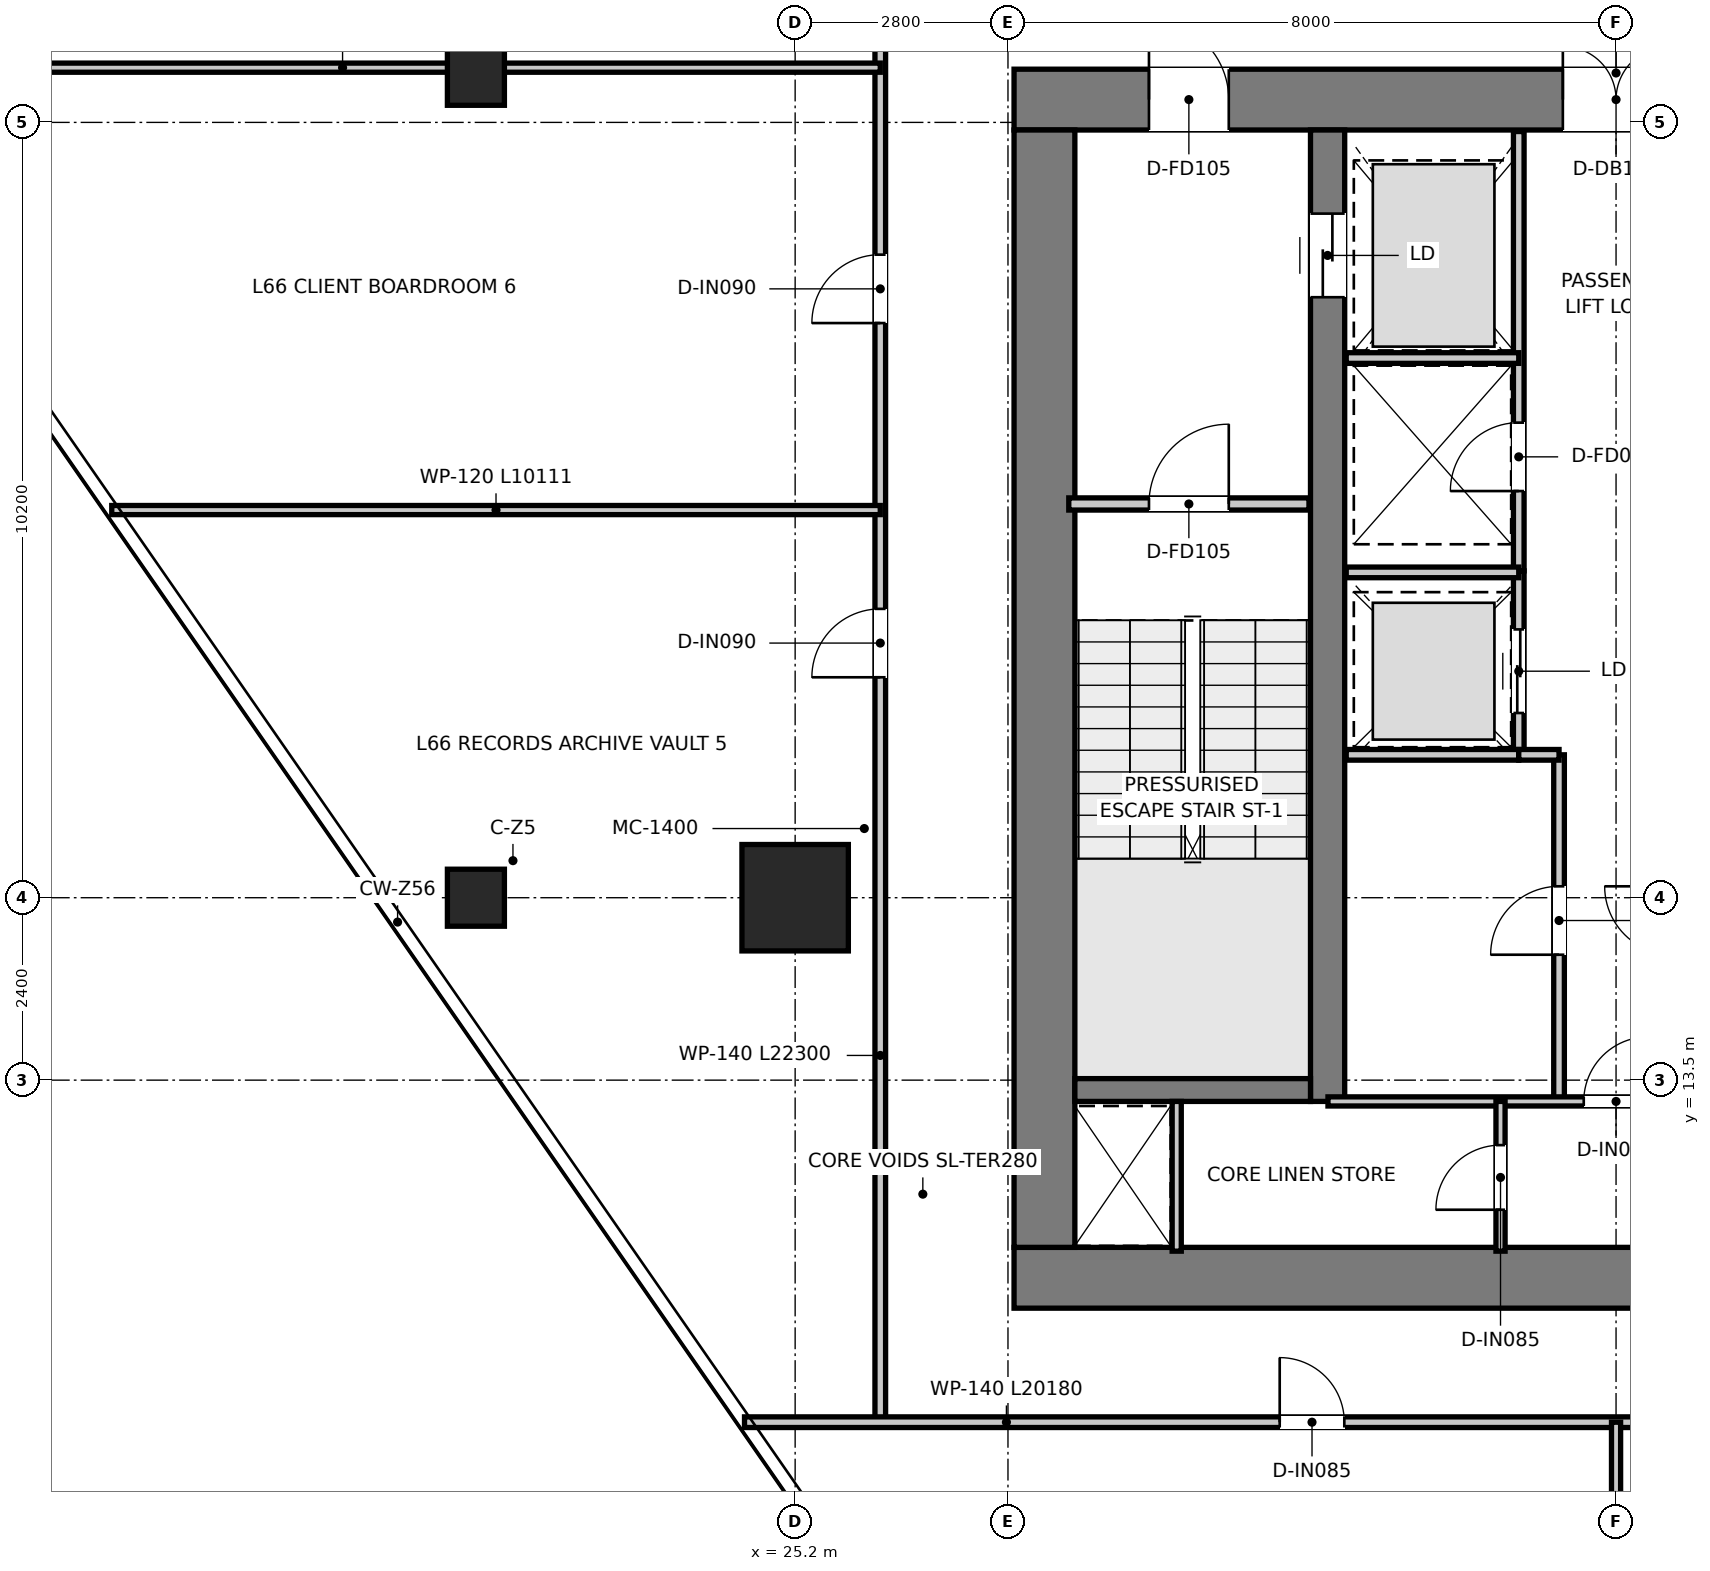
"""IFC4 building model, lengths in metres.
Left out: names, types, materials, properties, quantities, classifications, styles, units other than length and angle.
Written with IfcOpenShell. Run it as: python <this file> out.ifc"""

import sys

from ifc_helpers import new_model, si_unit, direction, frame, frame_2d, origin, origin_2d, place, context, subcontext, project, spatial, rectangle, extrude, source, transform, mapped, element, fill, save


model = new_model("IFC4")
c1 = context("Model", 3, precision=1e-05, world=origin(), true_north=direction((0.0, 1.0)))
c2 = subcontext(c1, "Body", "Model", "MODEL_VIEW")
j1 = project(units=[si_unit("LENGTHUNIT", "METRE"), si_unit("PLANEANGLEUNIT", "RADIAN")], contexts=[c1])
p1 = place(None, origin())
s1 = spatial("IfcSite", under=j1, at=p1, CompositionType="ELEMENT")
p2 = place(p1, origin())
s2 = spatial("IfcBuilding", under=s1, at=p2, CompositionType="ELEMENT")
p3 = place(p2, frame((0.0, 0.0, 271.35)))
s3 = spatial("IfcBuildingStorey", under=s2, at=p3, CompositionType="ELEMENT", Elevation=271.35)
p4 = place(p3, frame((28.08, 10.9, 0.0), z_axis=(0.0, 0.0, 1.0), x_axis=(1.0, 0.0, 0.0)))
e1 = element("IfcWall", 1, at=p4, inside=s3, PredefinedType="SHEAR", context=c2, shape_type="SweptSolid", body=[
    extrude(rectangle(XDim=15.84, YDim=0.8, at=frame_2d((7.92, 0.0))), origin(), (0.0, 0.0, 1.0), 3.95),
])
p5 = place(p3, frame((28.08, 26.4, 0.0), z_axis=(0.0, 0.0, 1.0), x_axis=(1.0, 0.0, 0.0)))
e2 = element("IfcWall", 2, at=p5, inside=s3, PredefinedType="SHEAR", context=c2, shape_type="SweptSolid", body=[
    extrude(rectangle(XDim=15.84, YDim=0.8, at=frame_2d((7.92, 0.0))), origin(), (0.0, 0.0, 1.0), 3.95),
])
p6 = place(p5, frame((7.22, 0.0, 0.0)))
e3 = element("IfcOpeningElement", 3, at=p6, cuts=e2, PredefinedType="OPENING", context=c2, shape_type="SweptSolid", body=[
    extrude(rectangle(XDim=1.4, YDim=2.2, at=frame_2d((0.7, 1.1))), frame((0.0, 0.41, 0.0), z_axis=(0.0, -1.0, 0.0), x_axis=(1.0, 0.0, 0.0)), (0.0, 0.0, 1.0), 0.82),
])
p7 = place(p5, frame((1.775, 0.0, 0.0)))
e4 = element("IfcOpeningElement", 4, at=p7, cuts=e2, PredefinedType="OPENING", context=c2, shape_type="SweptSolid", body=[
    extrude(rectangle(XDim=1.05, YDim=2.1, at=frame_2d((0.525, 1.05))), frame((0.0, 0.41, 0.0), z_axis=(0.0, -1.0, 0.0), x_axis=(1.0, 0.0, 0.0)), (0.0, 0.0, 1.0), 0.82),
])
p8 = place(p5, frame((13.015, 0.0, 0.0)))
e5 = element("IfcOpeningElement", 5, at=p8, cuts=e2, PredefinedType="OPENING", context=c2, shape_type="SweptSolid", body=[
    extrude(rectangle(XDim=1.05, YDim=2.1, at=frame_2d((0.525, 1.05))), frame((0.0, 0.41, 0.0), z_axis=(0.0, -1.0, 0.0), x_axis=(1.0, 0.0, 0.0)), (0.0, 0.0, 1.0), 0.82),
])
p9 = place(p3, frame((28.48, 11.3, 0.0), z_axis=(0.0, 0.0, 1.0), x_axis=(0.0, 1.0, 0.0)))
e6 = element("IfcWall", 6, at=p9, inside=s3, PredefinedType="SHEAR", context=c2, shape_type="SweptSolid", body=[
    extrude(rectangle(XDim=14.7, YDim=0.8, at=frame_2d((7.35, 0.0))), origin(), (0.0, 0.0, 1.0), 3.95),
])
p10 = place(p3, frame((32.205, 13.22, 0.0), z_axis=(0.0, 0.0, 1.0), x_axis=(0.0, 1.0, 0.0)))
e7 = element("IfcWall", 7, at=p10, inside=s3, PredefinedType="SHEAR", context=c2, shape_type="SweptSolid", body=[
    extrude(rectangle(XDim=12.78, YDim=0.45, at=frame_2d((6.39, 0.0))), origin(), (0.0, 0.0, 1.0), 3.95),
])
p11 = place(p10, frame((10.58, 0.0, 0.0)))
e8 = element("IfcOpeningElement", 8, at=p11, cuts=e7, PredefinedType="OPENING", context=c2, shape_type="SweptSolid", body=[
    extrude(rectangle(XDim=1.1, YDim=2.15, at=frame_2d((0.55, 1.075))), frame((0.0, 0.235, 0.0), z_axis=(0.0, -1.0, 0.0), x_axis=(1.0, 0.0, 0.0)), (0.0, 0.0, 1.0), 0.47),
])
p12 = place(p3, frame((28.88, 13.37, 0.0), z_axis=(0.0, 0.0, 1.0), x_axis=(1.0, 0.0, 0.0)))
e9 = element("IfcWall", 9, at=p12, inside=s3, PredefinedType="SHEAR", context=c2, shape_type="SweptSolid", body=[
    extrude(rectangle(XDim=3.1, YDim=0.3, at=frame_2d((1.55, 0.0))), origin(), (0.0, 0.0, 1.0), 3.95),
])
m1 = source(origin(), c2, "Body", "SweptSolid", [
    extrude(rectangle(XDim=1.4, YDim=1.4, at=origin_2d()), origin(), (0.0, 0.0, 1.0), 3.95),
])
p13 = place(p3, frame((25.2, 15.9, 0.0), z_axis=(0.0, 0.0, 1.0), x_axis=(1.0, 0.0, 0.0)))
e10 = element("IfcColumn", 10, at=p13, inside=s3, PredefinedType="USERDEFINED", context=c2, shape_type="MappedRepresentation", body=[
    mapped(m1, transform((0.0, 0.0, 0.0), x_axis=(1.0, 0.0, 0.0), y_axis=(0.0, 1.0, 0.0), z_axis=(0.0, 0.0, 1.0), scale=1.0)),
])
m2 = source(origin(), c2, "Body", "SweptSolid", [
    extrude(rectangle(XDim=0.75, YDim=0.75, at=origin_2d()), origin(), (0.0, 0.0, 1.0), 3.95),
])
for number, where, z_axis, x_axis in (
    (11, (21.0, 15.9, 0.0), (0.0, 0.0, 1.0), (1.0, 0.0, 0.0)),
    (12, (21.0, 26.7, 0.0), (0.0, 0.0, 1.0), (1.0, 0.0, 0.0)),
):
    element("IfcColumn", number, at=place(p3, frame(where, z_axis=z_axis, x_axis=x_axis)), inside=s3, PredefinedType="COLUMN", context=c2, shape_type="MappedRepresentation", body=[
        mapped(m2, transform((0.0, 0.0, 0.0), x_axis=(1.0, 0.0, 0.0), y_axis=(0.0, 1.0, 0.0), z_axis=(0.0, 0.0, 1.0), scale=1.0)),
    ])
p14 = place(p3, frame((28.8, 21.08, 0.0), z_axis=(0.0, 0.0, 1.0), x_axis=(1.0, 0.0, 0.0)))
e13 = element("IfcWall", 13, at=p14, inside=s3, PredefinedType="PARTITIONING", context=c2, shape_type="SweptSolid", body=[
    extrude(rectangle(XDim=3.16, YDim=0.16, at=frame_2d((1.58, 0.0))), origin(), (0.0, 0.0, 1.0), 3.67),
])
p15 = place(p14, frame((1.055, 0.0, 0.0)))
e14 = element("IfcOpeningElement", 14, at=p15, cuts=e13, PredefinedType="OPENING", context=c2, shape_type="SweptSolid", body=[
    extrude(rectangle(XDim=1.05, YDim=2.1, at=frame_2d((0.525, 1.05))), frame((0.0, 0.09, 0.0), z_axis=(0.0, -1.0, 0.0), x_axis=(1.0, 0.0, 0.0)), (0.0, 0.0, 1.0), 0.18),
])
p16 = place(p3, frame((34.72, 20.2, 0.0), z_axis=(0.0, 0.0, 1.0), x_axis=(0.0, 1.0, 0.0)))
e15 = element("IfcWall", 15, at=p16, inside=s3, PredefinedType="PARTITIONING", context=c2, shape_type="SweptSolid", body=[
    extrude(rectangle(XDim=5.78, YDim=0.14, at=frame_2d((2.89, 0.0))), origin(), (0.0, 0.0, 1.0), 2.82),
])
p17 = place(p16, frame((1.05, 0.0, 0.0)))
e16 = element("IfcOpeningElement", 16, at=p17, cuts=e15, PredefinedType="OPENING", context=c2, shape_type="SweptSolid", body=[
    extrude(rectangle(XDim=0.9, YDim=2.1, at=frame_2d((0.45, 1.05))), frame((0.0, 0.08, 0.0), z_axis=(0.0, -1.0, 0.0), x_axis=(1.0, 0.0, 0.0)), (0.0, 0.0, 1.0), 0.16),
])
p18 = place(p3, frame((32.45, 23.0, 0.0), z_axis=(0.0, 0.0, 1.0), x_axis=(1.0, 0.0, 0.0)))
e17 = element("IfcWall", 17, at=p18, inside=s3, PredefinedType="PARTITIONING", context=c2, shape_type="SweptSolid", body=[
    extrude(rectangle(XDim=2.27, YDim=0.14, at=frame_2d((1.135, 0.0))), origin(), (0.0, 0.0, 1.0), 2.82),
])
p19 = place(p3, frame((34.72, 17.78, 0.0), z_axis=(0.0, 0.0, 1.0), x_axis=(0.0, 1.0, 0.0)))
e18 = element("IfcWall", 18, at=p19, inside=s3, PredefinedType="PARTITIONING", context=c2, shape_type="SweptSolid", body=[
    extrude(rectangle(XDim=2.42, YDim=0.14, at=frame_2d((1.21, 0.0))), origin(), (0.0, 0.0, 1.0), 3.67),
])
p20 = place(p19, frame((0.55, 0.0, 0.0)))
e19 = element("IfcOpeningElement", 19, at=p20, cuts=e18, PredefinedType="OPENING", context=c2, shape_type="SweptSolid", body=[
    extrude(rectangle(XDim=1.1, YDim=2.15, at=frame_2d((0.55, 1.075))), frame((0.0, 0.08, 0.0), z_axis=(0.0, -1.0, 0.0), x_axis=(1.0, 0.0, 0.0)), (0.0, 0.0, 1.0), 0.16),
])
for number, where, z_axis, x_axis in (
    (20, (32.45, 17.78, 0.0), (0.0, 0.0, 1.0), (1.0, 0.0, 0.0)),
    (21, (32.45, 20.18, 0.0), (0.0, 0.0, 1.0), (1.0, 0.0, 0.0)),
):
    element("IfcWall", number, at=place(p3, frame(where, z_axis=z_axis, x_axis=x_axis)), inside=s3, PredefinedType="PARTITIONING", context=c2, shape_type="SweptSolid", body=[
        extrude(rectangle(XDim=2.27, YDim=0.14, at=frame_2d((1.135, 0.0))), origin(), (0.0, 0.0, 1.0), 3.67),
    ])
p21 = place(p3, frame((35.25, 13.22, 0.0), z_axis=(0.0, 0.0, 1.0), x_axis=(0.0, 1.0, 0.0)))
e22 = element("IfcWall", 22, at=p21, inside=s3, PredefinedType="PARTITIONING", context=c2, shape_type="SweptSolid", body=[
    extrude(rectangle(XDim=4.56, YDim=0.14, at=frame_2d((2.28, 0.0))), origin(), (0.0, 0.0, 1.0), 3.67),
])
p22 = place(p21, frame((1.93, 0.0, 0.0)))
e23 = element("IfcOpeningElement", 23, at=p22, cuts=e22, PredefinedType="OPENING", context=c2, shape_type="SweptSolid", body=[
    extrude(rectangle(XDim=0.9, YDim=2.1, at=frame_2d((0.45, 1.05))), frame((0.0, 0.08, 0.0), z_axis=(0.0, -1.0, 0.0), x_axis=(1.0, 0.0, 0.0)), (0.0, 0.0, 1.0), 0.16),
])
p23 = place(p3, frame((34.72, 17.78, 0.0), z_axis=(0.0, 0.0, 1.0), x_axis=(1.0, 0.0, 0.0)))
e24 = element("IfcWall", 24, at=p23, inside=s3, PredefinedType="PARTITIONING", context=c2, shape_type="SweptSolid", body=[
    extrude(rectangle(XDim=0.53, YDim=0.14, at=frame_2d((0.265, 0.0))), origin(), (0.0, 0.0, 1.0), 3.67),
])
p24 = place(p3, frame((30.22, 11.25, 0.0), z_axis=(0.0, 0.0, 1.0), x_axis=(0.0, 1.0, 0.0)))
e25 = element("IfcWall", 25, at=p24, inside=s3, PredefinedType="PARTITIONING", context=c2, shape_type="SweptSolid", body=[
    extrude(rectangle(XDim=1.97, YDim=0.12, at=frame_2d((0.985, 0.0))), origin(), (0.0, 0.0, 1.0), 3.67),
])
p25 = place(p3, frame((32.21, 13.22, 0.0), z_axis=(0.0, 0.0, 1.0), x_axis=(1.0, 0.0, 0.0)))
e26 = element("IfcWall", 26, at=p25, inside=s3, PredefinedType="PARTITIONING", context=c2, shape_type="SweptSolid", body=[
    extrude(rectangle(XDim=7.58, YDim=0.12, at=frame_2d((3.79, 0.0))), origin(), (0.0, 0.0, 1.0), 3.67),
])
p26 = place(p25, frame((3.365, 0.0, 0.0)))
e27 = element("IfcOpeningElement", 27, at=p26, cuts=e26, PredefinedType="OPENING", context=c2, shape_type="SweptSolid", body=[
    extrude(rectangle(XDim=0.85, YDim=2.1, at=frame_2d((0.425, 1.05))), frame((0.0, 0.07, 0.0), z_axis=(0.0, -1.0, 0.0), x_axis=(1.0, 0.0, 0.0)), (0.0, 0.0, 1.0), 0.14),
])
p27 = place(p3, frame((34.48, 11.25, 0.0), z_axis=(0.0, 0.0, 1.0), x_axis=(0.0, 1.0, 0.0)))
e28 = element("IfcWall", 28, at=p27, inside=s3, PredefinedType="PARTITIONING", context=c2, shape_type="SweptSolid", body=[
    extrude(rectangle(XDim=1.97, YDim=0.12, at=frame_2d((0.985, 0.0))), origin(), (0.0, 0.0, 1.0), 3.67),
])
p28 = place(p27, frame((0.545, 0.0, 0.0)))
e29 = element("IfcOpeningElement", 29, at=p28, cuts=e28, PredefinedType="OPENING", context=c2, shape_type="SweptSolid", body=[
    extrude(rectangle(XDim=0.85, YDim=2.1, at=frame_2d((0.425, 1.05))), frame((0.0, 0.07, 0.0), z_axis=(0.0, -1.0, 0.0), x_axis=(1.0, 0.0, 0.0)), (0.0, 0.0, 1.0), 0.14),
])
p29 = place(p3, frame((26.32, 9.0, 0.0), z_axis=(0.0, 0.0, 1.0), x_axis=(0.0, 1.0, 0.0)))
e30 = element("IfcWall", 30, at=p29, inside=s3, PredefinedType="PARTITIONING", context=c2, shape_type="SweptSolid", body=[
    extrude(rectangle(XDim=19.66, YDim=0.14, at=frame_2d((9.83, 0.0))), origin(), (0.0, 0.0, 1.0), 3.13),
])
p30 = place(p29, frame((18.3, 0.0, 0.0)))
e31 = element("IfcOpeningElement", 31, at=p30, cuts=e30, PredefinedType="OPENING", context=c2, shape_type="SweptSolid", body=[
    extrude(rectangle(XDim=0.9, YDim=2.1, at=frame_2d((0.45, 1.05))), frame((0.0, 0.08, 0.0), z_axis=(0.0, -1.0, 0.0), x_axis=(1.0, 0.0, 0.0)), (0.0, 0.0, 1.0), 0.16),
])
p31 = place(p29, frame((9.8, 0.0, 0.0)))
e32 = element("IfcOpeningElement", 32, at=p31, cuts=e30, PredefinedType="OPENING", context=c2, shape_type="SweptSolid", body=[
    extrude(rectangle(XDim=0.9, YDim=2.1, at=frame_2d((0.45, 1.05))), frame((0.0, 0.08, 0.0), z_axis=(0.0, -1.0, 0.0), x_axis=(1.0, 0.0, 0.0)), (0.0, 0.0, 1.0), 0.16),
])
p32 = place(p29, frame((14.46, 0.0, 0.0)))
e33 = element("IfcOpeningElement", 33, at=p32, cuts=e30, PredefinedType="OPENING", context=c2, shape_type="SweptSolid", body=[
    extrude(rectangle(XDim=0.9, YDim=2.1, at=frame_2d((0.45, 1.05))), frame((0.0, 0.08, 0.0), z_axis=(0.0, -1.0, 0.0), x_axis=(1.0, 0.0, 0.0)), (0.0, 0.0, 1.0), 0.16),
])
p33 = place(p3, frame((24.534, 9.0, 0.0), z_axis=(0.0, 0.0, 1.0), x_axis=(1.0, 0.0, 0.0)))
e34 = element("IfcWall", 34, at=p33, inside=s3, PredefinedType="PARTITIONING", context=c2, shape_type="SweptSolid", body=[
    extrude(rectangle(XDim=20.18, YDim=0.14, at=frame_2d((10.09, 0.0))), origin(), (0.0, 0.0, 1.0), 3.67),
])
p34 = place(p33, frame((7.041, 0.0, 0.0)))
e35 = element("IfcOpeningElement", 35, at=p34, cuts=e34, PredefinedType="OPENING", context=c2, shape_type="SweptSolid", body=[
    extrude(rectangle(XDim=0.85, YDim=2.1, at=frame_2d((0.425, 1.05))), frame((0.0, 0.08, 0.0), z_axis=(0.0, -1.0, 0.0), x_axis=(1.0, 0.0, 0.0)), (0.0, 0.0, 1.0), 0.16),
])
p35 = place(p33, frame((15.041, 0.0, 0.0)))
e36 = element("IfcOpeningElement", 36, at=p35, cuts=e34, PredefinedType="OPENING", context=c2, shape_type="SweptSolid", body=[
    extrude(rectangle(XDim=0.85, YDim=2.1, at=frame_2d((0.425, 1.05))), frame((0.0, 0.08, 0.0), z_axis=(0.0, -1.0, 0.0), x_axis=(1.0, 0.0, 0.0)), (0.0, 0.0, 1.0), 0.16),
])
p36 = place(p3, frame((12.172, 26.82, 0.0), z_axis=(0.0, 0.0, 1.0), x_axis=(1.0, 0.0, 0.0)))
e37 = element("IfcWall", 37, at=p36, inside=s3, PredefinedType="PARTITIONING", context=c2, shape_type="SweptSolid", body=[
    extrude(rectangle(XDim=14.148, YDim=0.12, at=frame_2d((7.074, 0.0))), origin(), (0.0, 0.0, 1.0), 3.13),
])
p37 = place(p3, frame((16.209, 21.0, 0.0), z_axis=(0.0, 0.0, 1.0), x_axis=(1.0, 0.0, 0.0)))
e38 = element("IfcWall", 38, at=p37, inside=s3, PredefinedType="PARTITIONING", context=c2, shape_type="SweptSolid", body=[
    extrude(rectangle(XDim=10.111, YDim=0.12, at=frame_2d((5.055, 0.0))), origin(), (0.0, 0.0, 1.0), 3.13),
])
p38 = place(p3, frame((36.0, 2.955, 0.0), z_axis=(0.0, 0.0, 1.0), x_axis=(0.0, 1.0, 0.0)))
e39 = element("IfcWall", 39, at=p38, inside=s3, PredefinedType="PARTITIONING", context=c2, shape_type="SweptSolid", body=[
    extrude(rectangle(XDim=6.045, YDim=0.12, at=frame_2d((3.022, 0.0))), origin(), (0.0, 0.0, 1.0), 3.67),
])
p39 = place(p15, origin())
e40 = element("IfcDoor", 40, at=p39, inside=s3, OperationType="SINGLE_SWING_RIGHT", PredefinedType="DOOR", context=c2, shape_type="SweptSolid", body=[
    extrude(rectangle(XDim=1.05, YDim=2.1, at=frame_2d((0.525, 1.05))), frame((0.0, 0.025, 0.0), z_axis=(0.0, -1.0, 0.0), x_axis=(1.0, 0.0, 0.0)), (0.0, 0.0, 1.0), 0.05),
])
fill(e14, e40)
p40 = place(p6, origin())
e41 = element("IfcDoor", 41, at=p40, inside=s3, OperationType="DOUBLE_DOOR_SINGLE_SWING", PredefinedType="DOOR", context=c2, shape_type="SweptSolid", body=[
    extrude(rectangle(XDim=1.4, YDim=2.2, at=frame_2d((0.7, 1.1))), frame((0.0, 0.025, 0.0), z_axis=(0.0, -1.0, 0.0), x_axis=(1.0, 0.0, 0.0)), (0.0, 0.0, 1.0), 0.05),
])
fill(e3, e41)
p41 = place(p7, origin())
e42 = element("IfcDoor", 42, at=p41, inside=s3, OperationType="SINGLE_SWING_LEFT", PredefinedType="DOOR", context=c2, shape_type="SweptSolid", body=[
    extrude(rectangle(XDim=1.05, YDim=2.1, at=frame_2d((0.525, 1.05))), frame((0.0, 0.025, 0.0), z_axis=(0.0, -1.0, 0.0), x_axis=(1.0, 0.0, 0.0)), (0.0, 0.0, 1.0), 0.05),
])
fill(e4, e42)
p42 = place(p11, origin())
e43 = element("IfcDoor", 43, at=p42, inside=s3, OperationType="DOUBLE_DOOR_SLIDING", PredefinedType="DOOR", context=c2, shape_type="SweptSolid", body=[
    extrude(rectangle(XDim=1.1, YDim=2.15, at=frame_2d((0.55, 1.075))), frame((0.0, 0.025, 0.0), z_axis=(0.0, -1.0, 0.0), x_axis=(1.0, 0.0, 0.0)), (0.0, 0.0, 1.0), 0.05),
])
fill(e8, e43)
p43 = place(p17, origin())
e44 = element("IfcDoor", 44, at=p43, inside=s3, OperationType="SINGLE_SWING_LEFT", PredefinedType="DOOR", context=c2, shape_type="SweptSolid", body=[
    extrude(rectangle(XDim=0.9, YDim=2.1, at=frame_2d((0.45, 1.05))), frame((0.0, 0.025, 0.0), z_axis=(0.0, -1.0, 0.0), x_axis=(1.0, 0.0, 0.0)), (0.0, 0.0, 1.0), 0.05),
])
fill(e16, e44)
p44 = place(p20, origin())
e45 = element("IfcDoor", 45, at=p44, inside=s3, OperationType="DOUBLE_DOOR_SLIDING", PredefinedType="DOOR", context=c2, shape_type="SweptSolid", body=[
    extrude(rectangle(XDim=1.1, YDim=2.15, at=frame_2d((0.55, 1.075))), frame((0.0, 0.025, 0.0), z_axis=(0.0, -1.0, 0.0), x_axis=(1.0, 0.0, 0.0)), (0.0, 0.0, 1.0), 0.05),
])
fill(e19, e45)
p45 = place(p22, origin())
e46 = element("IfcDoor", 46, at=p45, inside=s3, OperationType="SINGLE_SWING_LEFT", PredefinedType="DOOR", context=c2, shape_type="SweptSolid", body=[
    extrude(rectangle(XDim=0.9, YDim=2.1, at=frame_2d((0.45, 1.05))), frame((0.0, 0.025, 0.0), z_axis=(0.0, -1.0, 0.0), x_axis=(1.0, 0.0, 0.0)), (0.0, 0.0, 1.0), 0.05),
])
fill(e23, e46)
p46 = place(p26, origin())
e47 = element("IfcDoor", 47, at=p46, inside=s3, OperationType="SINGLE_SWING_RIGHT", PredefinedType="DOOR", context=c2, shape_type="SweptSolid", body=[
    extrude(rectangle(XDim=0.85, YDim=2.1, at=frame_2d((0.425, 1.05))), frame((0.0, 0.025, 0.0), z_axis=(0.0, -1.0, 0.0), x_axis=(1.0, 0.0, 0.0)), (0.0, 0.0, 1.0), 0.05),
])
fill(e27, e47)
p47 = place(p28, origin())
e48 = element("IfcDoor", 48, at=p47, inside=s3, OperationType="SINGLE_SWING_LEFT", PredefinedType="DOOR", context=c2, shape_type="SweptSolid", body=[
    extrude(rectangle(XDim=0.85, YDim=2.1, at=frame_2d((0.425, 1.05))), frame((0.0, 0.025, 0.0), z_axis=(0.0, -1.0, 0.0), x_axis=(1.0, 0.0, 0.0)), (0.0, 0.0, 1.0), 0.05),
])
fill(e29, e48)
p48 = place(p31, origin())
e49 = element("IfcDoor", 49, at=p48, inside=s3, OperationType="SINGLE_SWING_LEFT", PredefinedType="DOOR", context=c2, shape_type="SweptSolid", body=[
    extrude(rectangle(XDim=0.9, YDim=2.1, at=frame_2d((0.45, 1.05))), frame((0.0, 0.025, 0.0), z_axis=(0.0, -1.0, 0.0), x_axis=(1.0, 0.0, 0.0)), (0.0, 0.0, 1.0), 0.05),
])
fill(e32, e49)
p49 = place(p32, origin())
e50 = element("IfcDoor", 50, at=p49, inside=s3, OperationType="SINGLE_SWING_LEFT", PredefinedType="DOOR", context=c2, shape_type="SweptSolid", body=[
    extrude(rectangle(XDim=0.9, YDim=2.1, at=frame_2d((0.45, 1.05))), frame((0.0, 0.025, 0.0), z_axis=(0.0, -1.0, 0.0), x_axis=(1.0, 0.0, 0.0)), (0.0, 0.0, 1.0), 0.05),
])
fill(e33, e50)
p50 = place(p34, origin())
e51 = element("IfcDoor", 51, at=p50, inside=s3, OperationType="SINGLE_SWING_LEFT", PredefinedType="DOOR", context=c2, shape_type="SweptSolid", body=[
    extrude(rectangle(XDim=0.85, YDim=2.1, at=frame_2d((0.425, 1.05))), frame((0.0, 0.025, 0.0), z_axis=(0.0, -1.0, 0.0), x_axis=(1.0, 0.0, 0.0)), (0.0, 0.0, 1.0), 0.05),
])
fill(e35, e51)
save(model, sys.argv[1])
